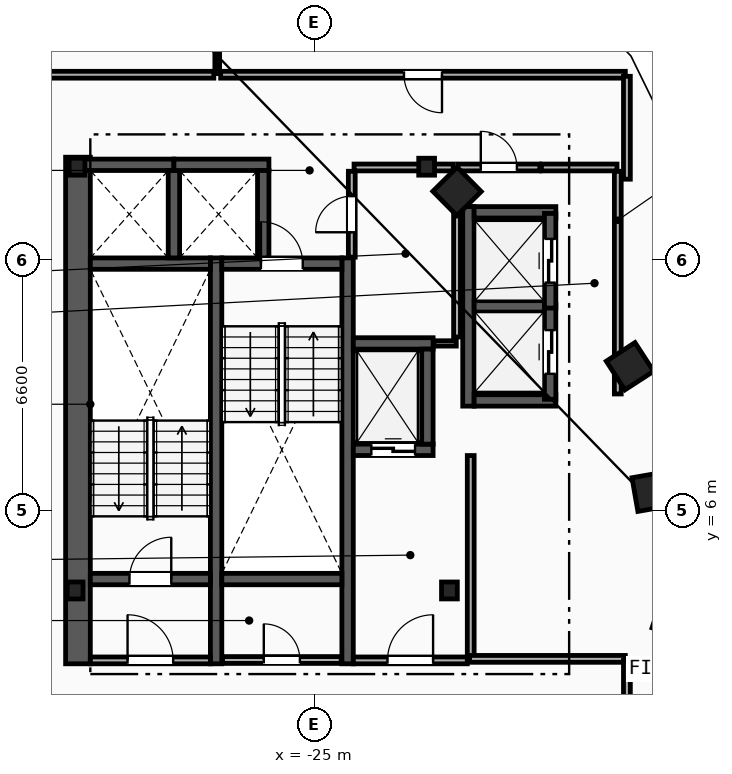
"""IFC4 building model, lengths in metres.
Left out: names, types, materials, properties, quantities, classifications, styles, units other than length and angle.
Written with IfcOpenShell. Run it as: python <this file> out.ifc"""

import sys

from ifc_helpers import new_model, si_unit, direction, frame, frame_2d, origin, origin_2d, place, context, subcontext, project, spatial, rectangle, i_section, extrude, element, fill, save


model = new_model("IFC4")
c1 = context("Model", 3, precision=1e-05, world=origin(), true_north=direction((0.0, 1.0)))
c2 = subcontext(c1, "Body", "Model", "MODEL_VIEW")
j1 = project(units=[si_unit("LENGTHUNIT", "METRE"), si_unit("PLANEANGLEUNIT", "RADIAN")], contexts=[c1])
p1 = place(None, origin())
s1 = spatial("IfcSite", under=j1, at=p1, CompositionType="ELEMENT")
p2 = place(p1, origin())
s2 = spatial("IfcBuilding", under=s1, at=p2, CompositionType="ELEMENT")
p3 = place(p2, frame((0.0, 0.0, 206.2)))
s3 = spatial("IfcBuildingStorey", under=s2, at=p3, CompositionType="ELEMENT", Elevation=206.2)
for number, where, z_axis, x_axis in (
    (1, (-31.3, 3.9, 0.0), (0.0, 0.0, 1.0), (1.0, 0.0, 0.0)),
    (2, (-21.45, 3.9, 0.0), (0.0, 0.0, 1.0), (1.0, 0.0, 0.0)),
    (3, (-22.05, 15.05, 0.0), (0.0, 0.0, 1.0), (1.0, 0.0, 0.0)),
    (4, (-31.25, 15.05, 0.0), (0.0, 0.0, 1.0), (1.0, 0.0, 0.0)),
):
    element("IfcColumn", number, at=place(p3, frame(where, z_axis=z_axis, x_axis=x_axis)), inside=s3, PredefinedType="COLUMN", context=c2, shape_type="SweptSolid", body=[
        extrude(i_section(OverallWidth=0.416, OverallDepth=0.446, WebThickness=0.039, FlangeThickness=0.063, FilletRadius=0.018, at=origin_2d()), origin(), (0.0, 0.0, 1.0), 3.6),
    ])
for number, where, z_axis, x_axis in (
    (5, (-15.55, 3.2, 0.0), (0.0, 0.0, 1.0), (0.315, 0.949, 0.0)),
    (6, (-16.125, 6.5, 0.0), (0.0, 0.0, 1.0), (-0.172, 0.985, 0.0)),
    (7, (-16.7, 9.8, 0.0), (0.0, 0.0, 1.0), (-0.544, 0.839, 0.0)),
    (8, (-21.25, 14.4, 0.0), (0.0, 0.0, 1.0), (-0.703, 0.711, 0.0)),
):
    element("IfcColumn", number, at=place(p3, frame(where, z_axis=z_axis, x_axis=x_axis)), inside=s3, PredefinedType="COLUMN", context=c2, shape_type="SweptSolid", body=[
        extrude(rectangle(XDim=0.9, YDim=0.9, at=origin_2d()), origin(), (0.0, 0.0, 1.0), 3.6),
    ])
p4 = place(p3, frame((-31.225, 1.97, 0.0), z_axis=(0.0, 0.0, 1.0), x_axis=(0.0, 1.0, 0.0)))
e9 = element("IfcWall", 9, at=p4, inside=s3, PredefinedType="SHEAR", context=c2, shape_type="SweptSolid", body=[
    extrude(rectangle(XDim=13.33, YDim=0.65, at=frame_2d((6.665, 0.0))), origin(), (0.0, 0.0, 1.0), 3.34),
])
for number, where, z_axis, x_axis in (
    (10, (-27.59, 1.97, 0.0), (0.0, 0.0, 1.0), (0.0, 1.0, 0.0)),
    (11, (-24.13, 1.97, 0.0), (0.0, 0.0, 1.0), (0.0, 1.0, 0.0)),
):
    element("IfcWall", number, at=place(p3, frame(where, z_axis=z_axis, x_axis=x_axis)), inside=s3, PredefinedType="SHEAR", context=c2, shape_type="SweptSolid", body=[
        extrude(rectangle(XDim=10.68, YDim=0.3, at=frame_2d((5.34, 0.0))), origin(), (0.0, 0.0, 1.0), 3.34),
    ])
p5 = place(p3, frame((-30.9, 4.2, 0.0), z_axis=(0.0, 0.0, 1.0), x_axis=(1.0, 0.0, 0.0)))
e12 = element("IfcWall", 12, at=p5, inside=s3, PredefinedType="SHEAR", context=c2, shape_type="SweptSolid", body=[
    extrude(rectangle(XDim=3.16, YDim=0.3, at=frame_2d((1.58, 0.0))), origin(), (0.0, 0.0, 1.0), 3.34),
])
p6 = place(p5, frame((1.03, 0.0, 0.0)))
e13 = element("IfcOpeningElement", 13, at=p6, cuts=e12, PredefinedType="OPENING", context=c2, shape_type="SweptSolid", body=[
    extrude(rectangle(XDim=1.1, YDim=2.15, at=frame_2d((0.55, 1.075))), frame((0.0, 0.16, 0.0), z_axis=(0.0, -1.0, 0.0), x_axis=(1.0, 0.0, 0.0)), (0.0, 0.0, 1.0), 0.32),
])
p7 = place(p3, frame((-30.9, 12.5, 0.0), z_axis=(0.0, 0.0, 1.0), x_axis=(1.0, 0.0, 0.0)))
e14 = element("IfcWall", 14, at=p7, inside=s3, PredefinedType="SHEAR", context=c2, shape_type="SweptSolid", body=[
    extrude(rectangle(XDim=3.16, YDim=0.3, at=frame_2d((1.58, 0.0))), origin(), (0.0, 0.0, 1.0), 3.34),
])
p8 = place(p3, frame((-27.44, 12.5, 0.0), z_axis=(0.0, 0.0, 1.0), x_axis=(1.0, 0.0, 0.0)))
e15 = element("IfcWall", 15, at=p8, inside=s3, PredefinedType="SHEAR", context=c2, shape_type="SweptSolid", body=[
    extrude(rectangle(XDim=3.16, YDim=0.3, at=frame_2d((1.58, 0.0))), origin(), (0.0, 0.0, 1.0), 3.34),
])
p9 = place(p8, frame((1.03, 0.0, 0.0)))
e16 = element("IfcOpeningElement", 16, at=p9, cuts=e15, PredefinedType="OPENING", context=c2, shape_type="SweptSolid", body=[
    extrude(rectangle(XDim=1.1, YDim=2.15, at=frame_2d((0.55, 1.075))), frame((0.0, 0.16, 0.0), z_axis=(0.0, -1.0, 0.0), x_axis=(1.0, 0.0, 0.0)), (0.0, 0.0, 1.0), 0.32),
])
p10 = place(p3, frame((-27.44, 4.2, 0.0), z_axis=(0.0, 0.0, 1.0), x_axis=(1.0, 0.0, 0.0)))
e17 = element("IfcWall", 17, at=p10, inside=s3, PredefinedType="SHEAR", context=c2, shape_type="SweptSolid", body=[
    extrude(rectangle(XDim=3.16, YDim=0.3, at=frame_2d((1.58, 0.0))), origin(), (0.0, 0.0, 1.0), 3.34),
])
p11 = place(p3, frame((-20.89, 2.15, 0.0), z_axis=(0.0, 0.0, 1.0), x_axis=(0.0, 1.0, 0.0)))
e18 = element("IfcWall", 18, at=p11, inside=s3, PredefinedType="PARTITIONING", context=c2, shape_type="SweptSolid", body=[
    extrude(rectangle(XDim=5.3, YDim=0.18, at=frame_2d((2.65, 0.0))), origin(), (0.0, 0.0, 1.0), 3.34),
])
p12 = place(p3, frame((-23.98, 2.06, 0.0), z_axis=(0.0, 0.0, 1.0), x_axis=(1.0, 0.0, 0.0)))
e19 = element("IfcWall", 19, at=p12, inside=s3, PredefinedType="PARTITIONING", context=c2, shape_type="SweptSolid", body=[
    extrude(rectangle(XDim=3.0, YDim=0.18, at=frame_2d((1.5, 0.0))), origin(), (0.0, 0.0, 1.0), 3.34),
])
p13 = place(p12, frame((0.9, 0.0, 0.0)))
e20 = element("IfcOpeningElement", 20, at=p13, cuts=e19, PredefinedType="OPENING", context=c2, shape_type="SweptSolid", body=[
    extrude(rectangle(XDim=1.2, YDim=2.15, at=frame_2d((0.6, 1.075))), frame((0.0, 0.1, 0.0), z_axis=(0.0, -1.0, 0.0), x_axis=(1.0, 0.0, 0.0)), (0.0, 0.0, 1.0), 0.2),
])
p14 = place(p3, frame((-30.9, 2.06, 0.0), z_axis=(0.0, 0.0, 1.0), x_axis=(1.0, 0.0, 0.0)))
e21 = element("IfcWall", 21, at=p14, inside=s3, PredefinedType="PARTITIONING", context=c2, shape_type="SweptSolid", body=[
    extrude(rectangle(XDim=3.16, YDim=0.18, at=frame_2d((1.58, 0.0))), origin(), (0.0, 0.0, 1.0), 3.34),
])
p15 = place(p14, frame((0.98, 0.0, 0.0)))
e22 = element("IfcOpeningElement", 22, at=p15, cuts=e21, PredefinedType="OPENING", context=c2, shape_type="SweptSolid", body=[
    extrude(rectangle(XDim=1.2, YDim=2.15, at=frame_2d((0.6, 1.075))), frame((0.0, 0.1, 0.0), z_axis=(0.0, -1.0, 0.0), x_axis=(1.0, 0.0, 0.0)), (0.0, 0.0, 1.0), 0.2),
])
p16 = place(p3, frame((-23.98, 7.6, 0.0), z_axis=(0.0, 0.0, 1.0), x_axis=(1.0, 0.0, 0.0)))
e23 = element("IfcWall", 23, at=p16, inside=s3, PredefinedType="SHEAR", context=c2, shape_type="SweptSolid", body=[
    extrude(rectangle(XDim=2.1, YDim=0.3, at=frame_2d((1.05, 0.0))), origin(), (0.0, 0.0, 1.0), 3.34),
])
p17 = place(p16, frame((0.475, 0.0, 0.0)))
e24 = element("IfcOpeningElement", 24, at=p17, cuts=e23, PredefinedType="OPENING", context=c2, shape_type="SweptSolid", body=[
    extrude(rectangle(XDim=1.15, YDim=2.2, at=frame_2d((0.575, 1.1))), frame((0.0, 0.16, 0.0), z_axis=(0.0, -1.0, 0.0), x_axis=(1.0, 0.0, 0.0)), (0.0, 0.0, 1.0), 0.32),
])
p18 = place(p3, frame((-23.98, 10.4, 0.0), z_axis=(0.0, 0.0, 1.0), x_axis=(1.0, 0.0, 0.0)))
e25 = element("IfcWall", 25, at=p18, inside=s3, PredefinedType="SHEAR", context=c2, shape_type="SweptSolid", body=[
    extrude(rectangle(XDim=2.1, YDim=0.3, at=frame_2d((1.05, 0.0))), origin(), (0.0, 0.0, 1.0), 3.34),
])
for number, where, z_axis, x_axis in (
    (26, (-22.03, 7.75, 0.0), (0.0, 0.0, 1.0), (0.0, 1.0, 0.0)),
    (27, (-31.2, 15.1, 0.0), (0.0, 0.0, 1.0), (1.0, 0.0, 0.0)),
):
    element("IfcWall", number, at=place(p3, frame(where, z_axis=z_axis, x_axis=x_axis)), inside=s3, PredefinedType="SHEAR", context=c2, shape_type="SweptSolid", body=[
        extrude(rectangle(XDim=2.5, YDim=0.3, at=frame_2d((1.25, 0.0))), origin(), (0.0, 0.0, 1.0), 3.34),
    ])
p19 = place(p3, frame((-28.7, 12.65, 0.0), z_axis=(0.0, 0.0, 1.0), x_axis=(0.0, 1.0, 0.0)))
e28 = element("IfcWall", 28, at=p19, inside=s3, PredefinedType="SHEAR", context=c2, shape_type="SweptSolid", body=[
    extrude(rectangle(XDim=2.3, YDim=0.3, at=frame_2d((1.15, 0.0))), origin(), (0.0, 0.0, 1.0), 3.34),
])
p20 = place(p3, frame((-28.7, 15.1, 0.0), z_axis=(0.0, 0.0, 1.0), x_axis=(1.0, 0.0, 0.0)))
e29 = element("IfcWall", 29, at=p20, inside=s3, PredefinedType="SHEAR", context=c2, shape_type="SweptSolid", body=[
    extrude(rectangle(XDim=2.5, YDim=0.3, at=frame_2d((1.25, 0.0))), origin(), (0.0, 0.0, 1.0), 3.34),
])
p21 = place(p3, frame((-26.35, 12.65, 0.0), z_axis=(0.0, 0.0, 1.0), x_axis=(0.0, 1.0, 0.0)))
e30 = element("IfcWall", 30, at=p21, inside=s3, PredefinedType="SHEAR", context=c2, shape_type="SweptSolid", body=[
    extrude(rectangle(XDim=2.3, YDim=0.3, at=frame_2d((1.15, 0.0))), origin(), (0.0, 0.0, 1.0), 3.34),
])
p22 = place(p3, frame((-20.95, 8.75, 0.0), z_axis=(0.0, 0.0, 1.0), x_axis=(0.0, 1.0, 0.0)))
e31 = element("IfcWall", 31, at=p22, inside=s3, PredefinedType="SHEAR", context=c2, shape_type="SweptSolid", body=[
    extrude(rectangle(XDim=5.25, YDim=0.3, at=frame_2d((2.625, 0.0))), origin(), (0.0, 0.0, 1.0), 3.34),
])
for number, where, z_axis, x_axis in (
    (32, (-20.8, 8.9, 0.0), (0.0, 0.0, 1.0), (1.0, 0.0, 0.0)),
    (33, (-20.8, 13.85, 0.0), (0.0, 0.0, 1.0), (1.0, 0.0, 0.0)),
):
    element("IfcWall", number, at=place(p3, frame(where, z_axis=z_axis, x_axis=x_axis)), inside=s3, PredefinedType="SHEAR", context=c2, shape_type="SweptSolid", body=[
        extrude(rectangle(XDim=2.15, YDim=0.3, at=frame_2d((1.075, 0.0))), origin(), (0.0, 0.0, 1.0), 3.34),
    ])
p23 = place(p3, frame((-20.8, 11.375, 0.0), z_axis=(0.0, 0.0, 1.0), x_axis=(1.0, 0.0, 0.0)))
e34 = element("IfcWall", 34, at=p23, inside=s3, PredefinedType="SHEAR", context=c2, shape_type="SweptSolid", body=[
    extrude(rectangle(XDim=1.85, YDim=0.3, at=frame_2d((0.925, 0.0))), origin(), (0.0, 0.0, 1.0), 3.34),
])
p24 = place(p3, frame((-18.8, 8.93, 0.0), z_axis=(0.0, 0.0, 1.0), x_axis=(0.0, 1.0, 0.0)))
e35 = element("IfcWall", 35, at=p24, inside=s3, PredefinedType="SHEAR", context=c2, shape_type="SweptSolid", body=[
    extrude(rectangle(XDim=2.49, YDim=0.3, at=frame_2d((1.245, 0.0))), origin(), (0.0, 0.0, 1.0), 3.34),
])
p25 = place(p24, frame((0.67, 0.0, 0.0)))
e36 = element("IfcOpeningElement", 36, at=p25, cuts=e35, PredefinedType="OPENING", context=c2, shape_type="SweptSolid", body=[
    extrude(rectangle(XDim=1.15, YDim=2.2, at=frame_2d((0.575, 1.1))), frame((0.0, 0.16, 0.0), z_axis=(0.0, -1.0, 0.0), x_axis=(1.0, 0.0, 0.0)), (0.0, 0.0, 1.0), 0.32),
])
p26 = place(p3, frame((-18.8, 11.33, 0.0), z_axis=(0.0, 0.0, 1.0), x_axis=(0.0, 1.0, 0.0)))
e37 = element("IfcWall", 37, at=p26, inside=s3, PredefinedType="SHEAR", context=c2, shape_type="SweptSolid", body=[
    extrude(rectangle(XDim=2.49, YDim=0.3, at=frame_2d((1.245, 0.0))), origin(), (0.0, 0.0, 1.0), 3.34),
])
p27 = place(p26, frame((0.67, 0.0, 0.0)))
e38 = element("IfcOpeningElement", 38, at=p27, cuts=e37, PredefinedType="OPENING", context=c2, shape_type="SweptSolid", body=[
    extrude(rectangle(XDim=1.15, YDim=2.2, at=frame_2d((0.575, 1.1))), frame((0.0, 0.16, 0.0), z_axis=(0.0, -1.0, 0.0), x_axis=(1.0, 0.0, 0.0)), (0.0, 0.0, 1.0), 0.32),
])
p28 = place(p3, frame((-17.02, 9.07, 0.0), z_axis=(0.0, 0.0, 1.0), x_axis=(0.0, 1.0, 0.0)))
e39 = element("IfcWall", 39, at=p28, inside=s3, PredefinedType="PARTITIONING", context=c2, shape_type="SweptSolid", body=[
    extrude(rectangle(XDim=5.86, YDim=0.18, at=frame_2d((2.93, 0.0))), origin(), (0.0, 0.0, 1.0), 3.34),
])
p29 = place(p3, frame((-21.23, 15.03, 0.0), z_axis=(0.0, 0.0, 1.0), x_axis=(1.0, 0.0, 0.0)))
e40 = element("IfcWall", 40, at=p29, inside=s3, PredefinedType="PARTITIONING", context=c2, shape_type="SweptSolid", body=[
    extrude(rectangle(XDim=2.16, YDim=0.18, at=frame_2d((1.08, 0.0))), origin(), (0.0, 0.0, 1.0), 3.34),
])
p30 = place(p29, frame((0.605, 0.0, 0.0)))
e41 = element("IfcOpeningElement", 41, at=p30, cuts=e40, PredefinedType="OPENING", context=c2, shape_type="SweptSolid", body=[
    extrude(rectangle(XDim=0.95, YDim=2.1, at=frame_2d((0.475, 1.05))), frame((0.0, 0.1, 0.0), z_axis=(0.0, -1.0, 0.0), x_axis=(1.0, 0.0, 0.0)), (0.0, 0.0, 1.0), 0.2),
])
p31 = place(p3, frame((-19.03, 15.03, 0.0), z_axis=(0.0, 0.0, 1.0), x_axis=(1.0, 0.0, 0.0)))
e42 = element("IfcWall", 42, at=p31, inside=s3, PredefinedType="PARTITIONING", context=c2, shape_type="SweptSolid", body=[
    extrude(rectangle(XDim=1.99, YDim=0.18, at=frame_2d((0.995, 0.0))), origin(), (0.0, 0.0, 1.0), 3.34),
])
p32 = place(p3, frame((-21.86, 10.4, 0.0), z_axis=(0.0, 0.0, 1.0), x_axis=(1.0, 0.0, 0.0)))
e43 = element("IfcWall", 43, at=p32, inside=s3, PredefinedType="PARTITIONING", context=c2, shape_type="SweptSolid", body=[
    extrude(rectangle(XDim=0.59, YDim=0.14, at=frame_2d((0.295, 0.0))), origin(), (0.0, 0.0, 1.0), 3.34),
])
p33 = place(p3, frame((-21.25, 10.57, 0.0), z_axis=(0.0, 0.0, 1.0), x_axis=(0.0, 1.0, 0.0)))
e44 = element("IfcWall", 44, at=p33, inside=s3, PredefinedType="PARTITIONING", context=c2, shape_type="SweptSolid", body=[
    extrude(rectangle(XDim=4.36, YDim=0.18, at=frame_2d((2.18, 0.0))), origin(), (0.0, 0.0, 1.0), 3.34),
])
p34 = place(p3, frame((-23.96, 15.03, 0.0), z_axis=(0.0, 0.0, 1.0), x_axis=(1.0, 0.0, 0.0)))
e45 = element("IfcWall", 45, at=p34, inside=s3, PredefinedType="PARTITIONING", context=c2, shape_type="SweptSolid", body=[
    extrude(rectangle(XDim=2.61, YDim=0.18, at=frame_2d((1.305, 0.0))), origin(), (0.0, 0.0, 1.0), 2.413),
])
p35 = place(p3, frame((-27.42, 2.07, 0.0), z_axis=(0.0, 0.0, 1.0), x_axis=(1.0, 0.0, 0.0)))
e46 = element("IfcWall", 46, at=p35, inside=s3, PredefinedType="PARTITIONING", context=c2, shape_type="SweptSolid", body=[
    extrude(rectangle(XDim=3.12, YDim=0.18, at=frame_2d((1.56, 0.0))), origin(), (0.0, 0.0, 1.0), 3.34),
])
p36 = place(p35, frame((1.085, 0.0, 0.0)))
e47 = element("IfcOpeningElement", 47, at=p36, cuts=e46, PredefinedType="OPENING", context=c2, shape_type="SweptSolid", body=[
    extrude(rectangle(XDim=0.95, YDim=2.1, at=frame_2d((0.475, 1.05))), frame((0.0, 0.1, 0.0), z_axis=(0.0, -1.0, 0.0), x_axis=(1.0, 0.0, 0.0)), (0.0, 0.0, 1.0), 0.2),
])
p37 = place(p3, frame((-24.02, 12.67, 0.0), z_axis=(0.0, 0.0, 1.0), x_axis=(0.0, 1.0, 0.0)))
e48 = element("IfcWall", 48, at=p37, inside=s3, PredefinedType="PARTITIONING", context=c2, shape_type="SweptSolid", body=[
    extrude(rectangle(XDim=2.26, YDim=0.18, at=frame_2d((1.13, 0.0))), origin(), (0.0, 0.0, 1.0), 3.34),
])
p38 = place(p37, frame((0.655, 0.0, 0.0)))
e49 = element("IfcOpeningElement", 49, at=p38, cuts=e48, PredefinedType="OPENING", context=c2, shape_type="SweptSolid", body=[
    extrude(rectangle(XDim=0.95, YDim=2.1, at=frame_2d((0.475, 1.05))), frame((0.0, 0.1, 0.0), z_axis=(0.0, -1.0, 0.0), x_axis=(1.0, 0.0, 0.0)), (0.0, 0.0, 1.0), 0.2),
])
p39 = place(p3, frame((-27.56, 17.5, 0.0), z_axis=(0.0, 0.0, 1.0), x_axis=(0.0, 1.0, 0.0)))
e50 = element("IfcWall", 50, at=p39, inside=s3, PredefinedType="PARTITIONING", context=c2, shape_type="SweptSolid", body=[
    extrude(rectangle(XDim=7.233, YDim=0.125, at=frame_2d((3.617, 0.0))), origin(), (0.0, 0.0, 1.0), 3.34),
])
p40 = place(p3, frame((-16.822, 17.47, 0.0), z_axis=(0.0, 0.0, 1.0), x_axis=(-1.0, 0.0, 0.0)))
e51 = element("IfcWall", 51, at=p40, inside=s3, PredefinedType="PARTITIONING", context=c2, shape_type="SweptSolid", body=[
    extrude(rectangle(XDim=10.648, YDim=0.18, at=frame_2d((5.324, 0.0))), origin(), (0.0, 0.0, 1.0), 3.34),
])
p41 = place(p40, frame((4.824, 0.0, 0.0)))
e52 = element("IfcOpeningElement", 52, at=p41, cuts=e51, PredefinedType="OPENING", context=c2, shape_type="SweptSolid", body=[
    extrude(rectangle(XDim=1.0, YDim=2.15, at=frame_2d((0.5, 1.075))), frame((0.0, 0.1, 0.0), z_axis=(0.0, -1.0, 0.0), x_axis=(1.0, 0.0, 0.0)), (0.0, 0.0, 1.0), 0.2),
])
p42 = place(p3, frame((-16.822, 2.1, 0.0), z_axis=(0.0, 0.0, 1.0), x_axis=(-1.0, 0.0, 0.0)))
e53 = element("IfcWall", 53, at=p42, inside=s3, PredefinedType="PARTITIONING", context=c2, shape_type="SweptSolid", body=[
    extrude(rectangle(XDim=4.098, YDim=0.18, at=frame_2d((2.049, 0.0))), origin(), (0.0, 0.0, 1.0), 3.34),
])
p43 = place(p3, frame((-16.78, 14.721, 0.0), z_axis=(0.0, 0.0, 1.0), x_axis=(0.0, 1.0, 0.0)))
e54 = element("IfcWall", 54, at=p43, inside=s3, PredefinedType="PARTITIONING", context=c2, shape_type="SweptSolid", body=[
    extrude(rectangle(XDim=2.707, YDim=0.18, at=frame_2d((1.354, 0.0))), origin(), (0.0, 0.0, 1.0), 3.34),
])
p44 = place(p3, frame((-16.78, -0.329, 0.0), z_axis=(0.0, 0.0, 1.0), x_axis=(0.0, 1.0, 0.0)))
e55 = element("IfcWall", 55, at=p44, inside=s3, PredefinedType="PARTITIONING", context=c2, shape_type="SweptSolid", body=[
    extrude(rectangle(XDim=2.387, YDim=0.18, at=frame_2d((1.194, 0.0))), origin(), (0.0, 0.0, 1.0), 3.34),
])
p45 = place(p3, frame((-27.65, 17.47, 0.0), z_axis=(0.0, 0.0, 1.0), x_axis=(-1.0, 0.0, 0.0)))
e56 = element("IfcWall", 56, at=p45, inside=s3, PredefinedType="PARTITIONING", context=c2, shape_type="SweptSolid", body=[
    extrude(rectangle(XDim=5.979, YDim=0.18, at=frame_2d((2.989, 0.0))), origin(), (0.0, 0.0, 1.0), 3.34),
])
p46 = place(p6, origin())
e57 = element("IfcDoor", 57, at=p46, inside=s3, OperationType="SINGLE_SWING_RIGHT", PredefinedType="DOOR", context=c2, shape_type="SweptSolid", body=[
    extrude(rectangle(XDim=1.1, YDim=2.15, at=frame_2d((0.55, 1.075))), frame((0.0, 0.025, 0.0), z_axis=(0.0, -1.0, 0.0), x_axis=(1.0, 0.0, 0.0)), (0.0, 0.0, 1.0), 0.05),
])
fill(e13, e57)
p47 = place(p9, origin())
e58 = element("IfcDoor", 58, at=p47, inside=s3, OperationType="SINGLE_SWING_LEFT", PredefinedType="DOOR", context=c2, shape_type="SweptSolid", body=[
    extrude(rectangle(XDim=1.1, YDim=2.15, at=frame_2d((0.55, 1.075))), frame((0.0, 0.025, 0.0), z_axis=(0.0, -1.0, 0.0), x_axis=(1.0, 0.0, 0.0)), (0.0, 0.0, 1.0), 0.05),
])
fill(e16, e58)
p48 = place(p13, origin())
e59 = element("IfcDoor", 59, at=p48, inside=s3, OperationType="SINGLE_SWING_RIGHT", PredefinedType="DOOR", context=c2, shape_type="SweptSolid", body=[
    extrude(rectangle(XDim=1.2, YDim=2.15, at=frame_2d((0.6, 1.075))), frame((0.0, 0.025, 0.0), z_axis=(0.0, -1.0, 0.0), x_axis=(1.0, 0.0, 0.0)), (0.0, 0.0, 1.0), 0.05),
])
fill(e20, e59)
p49 = place(p15, origin())
e60 = element("IfcDoor", 60, at=p49, inside=s3, OperationType="SINGLE_SWING_LEFT", PredefinedType="DOOR", context=c2, shape_type="SweptSolid", body=[
    extrude(rectangle(XDim=1.2, YDim=2.15, at=frame_2d((0.6, 1.075))), frame((0.0, 0.025, 0.0), z_axis=(0.0, -1.0, 0.0), x_axis=(1.0, 0.0, 0.0)), (0.0, 0.0, 1.0), 0.05),
])
fill(e22, e60)
p50 = place(p17, origin())
e61 = element("IfcDoor", 61, at=p50, inside=s3, OperationType="SLIDING_TO_LEFT", PredefinedType="TRAPDOOR", context=c2, shape_type="SweptSolid", body=[
    extrude(rectangle(XDim=1.15, YDim=2.2, at=frame_2d((0.575, 1.1))), frame((0.0, 0.025, 0.0), z_axis=(0.0, -1.0, 0.0), x_axis=(1.0, 0.0, 0.0)), (0.0, 0.0, 1.0), 0.05),
])
fill(e24, e61)
p51 = place(p25, origin())
e62 = element("IfcDoor", 62, at=p51, inside=s3, OperationType="SLIDING_TO_LEFT", PredefinedType="TRAPDOOR", context=c2, shape_type="SweptSolid", body=[
    extrude(rectangle(XDim=1.15, YDim=2.2, at=frame_2d((0.575, 1.1))), frame((0.0, 0.025, 0.0), z_axis=(0.0, -1.0, 0.0), x_axis=(1.0, 0.0, 0.0)), (0.0, 0.0, 1.0), 0.05),
])
fill(e36, e62)
p52 = place(p27, origin())
e63 = element("IfcDoor", 63, at=p52, inside=s3, OperationType="SLIDING_TO_LEFT", PredefinedType="TRAPDOOR", context=c2, shape_type="SweptSolid", body=[
    extrude(rectangle(XDim=1.15, YDim=2.2, at=frame_2d((0.575, 1.1))), frame((0.0, 0.025, 0.0), z_axis=(0.0, -1.0, 0.0), x_axis=(1.0, 0.0, 0.0)), (0.0, 0.0, 1.0), 0.05),
])
fill(e38, e63)
p53 = place(p41, origin())
e64 = element("IfcDoor", 64, at=p53, inside=s3, OperationType="SINGLE_SWING_LEFT", PredefinedType="DOOR", context=c2, shape_type="SweptSolid", body=[
    extrude(rectangle(XDim=1.0, YDim=2.15, at=frame_2d((0.5, 1.075))), frame((0.0, 0.025, 0.0), z_axis=(0.0, -1.0, 0.0), x_axis=(1.0, 0.0, 0.0)), (0.0, 0.0, 1.0), 0.05),
])
fill(e52, e64)
p54 = place(p36, origin())
e65 = element("IfcDoor", 65, at=p54, inside=s3, OperationType="SINGLE_SWING_LEFT", PredefinedType="DOOR", context=c2, shape_type="SweptSolid", body=[
    extrude(rectangle(XDim=0.95, YDim=2.1, at=frame_2d((0.475, 1.05))), frame((0.0, 0.025, 0.0), z_axis=(0.0, -1.0, 0.0), x_axis=(1.0, 0.0, 0.0)), (0.0, 0.0, 1.0), 0.05),
])
fill(e47, e65)
p55 = place(p38, origin())
e66 = element("IfcDoor", 66, at=p55, inside=s3, OperationType="SINGLE_SWING_LEFT", PredefinedType="DOOR", context=c2, shape_type="SweptSolid", body=[
    extrude(rectangle(XDim=0.95, YDim=2.1, at=frame_2d((0.475, 1.05))), frame((0.0, 0.025, 0.0), z_axis=(0.0, -1.0, 0.0), x_axis=(1.0, 0.0, 0.0)), (0.0, 0.0, 1.0), 0.05),
])
fill(e49, e66)
p56 = place(p30, origin())
e67 = element("IfcDoor", 67, at=p56, inside=s3, OperationType="SINGLE_SWING_LEFT", PredefinedType="DOOR", context=c2, shape_type="SweptSolid", body=[
    extrude(rectangle(XDim=0.95, YDim=2.1, at=frame_2d((0.475, 1.05))), frame((0.0, 0.025, 0.0), z_axis=(0.0, -1.0, 0.0), x_axis=(1.0, 0.0, 0.0)), (0.0, 0.0, 1.0), 0.05),
])
fill(e41, e67)
save(model, sys.argv[1])
